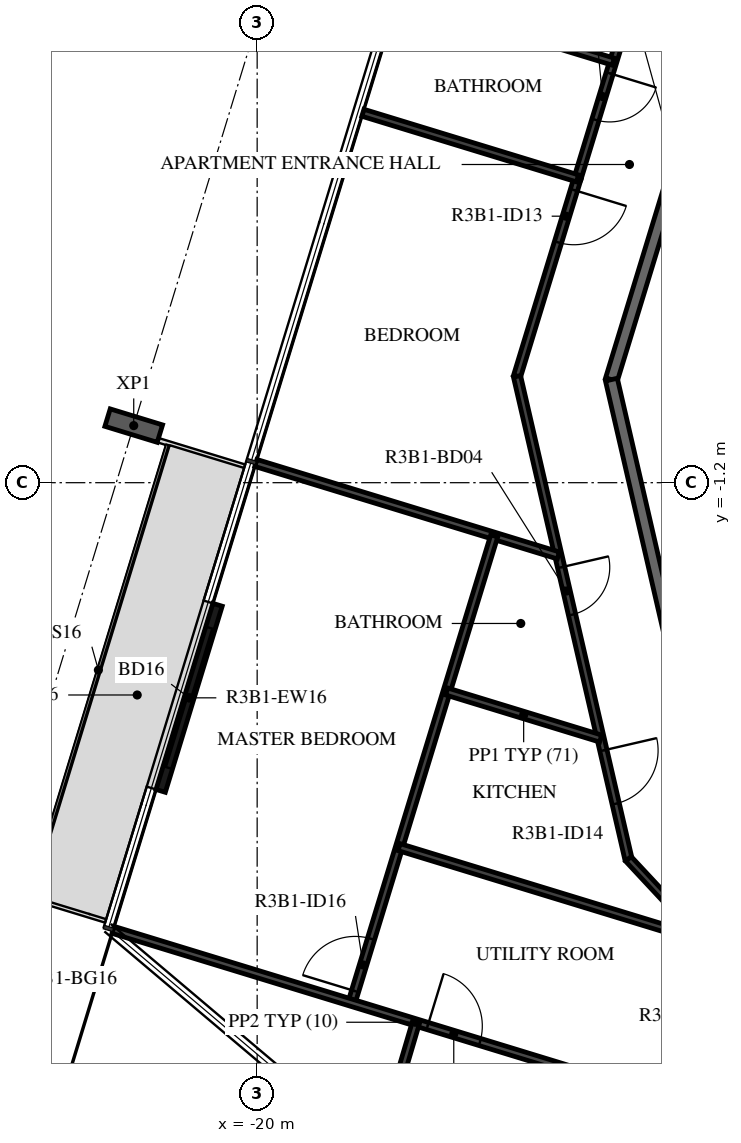
"""IFC4 building model, lengths in metres.
Left out: names, types, materials, properties, quantities, classifications, styles, units other than length and angle.
Written with IfcOpenShell. Run it as: python <this file> out.ifc"""

import sys

from ifc_helpers import new_model, si_unit, direction, frame, frame_2d, origin, origin_2d, place, context, subcontext, project, spatial, rectangle, i_section, extrude, element, fill, save


model = new_model("IFC4")
c1 = context("Model", 3, precision=1e-05, world=origin(), true_north=direction((0.0, 1.0)))
c2 = subcontext(c1, "Body", "Model", "MODEL_VIEW")
j1 = project(units=[si_unit("LENGTHUNIT", "METRE"), si_unit("PLANEANGLEUNIT", "RADIAN")], contexts=[c1])
p1 = place(None, origin())
s1 = spatial("IfcSite", under=j1, at=p1, CompositionType="ELEMENT")
p2 = place(p1, origin())
s2 = spatial("IfcBuilding", under=s1, at=p2, CompositionType="ELEMENT")
p3 = place(p2, frame((0.0, 0.0, 123.9)))
s3 = spatial("IfcBuildingStorey", under=s2, at=p3, CompositionType="ELEMENT", Elevation=123.9)
p4 = place(p3, frame((-22.03, -0.261, -0.38), z_axis=(0.0, 0.0, 1.0), x_axis=(0.29237190653, 0.956304694264, 0.0)))
e1 = element("IfcColumn", 1, at=p4, inside=s3, PredefinedType="COLUMN", context=c2, shape_type="SweptSolid", body=[
    extrude(i_section(OverallWidth=0.3, OverallDepth=0.9, WebThickness=0.019, FlangeThickness=0.035, FilletRadius=0.03, at=origin_2d()), origin(), (0.0, 0.0, 1.0), 3.5),
])
p5 = place(p3, frame((-20.651, -3.208, 0.0), z_axis=(0.0, 0.0, 1.0), x_axis=(-0.292369725807, -0.956305360976, 0.0)))
e2 = element("IfcWall", 2, at=p5, inside=s3, PredefinedType="STANDARD", context=c2, shape_type="SweptSolid", body=[
    extrude(rectangle(XDim=3.2, YDim=0.16, at=frame_2d((1.6, 0.0))), origin(), (0.0, 0.0, 1.0), 3.12),
])
p6 = place(p5, frame((0.4, 0.0, 0.0)))
e3 = element("IfcOpeningElement", 3, at=p6, cuts=e2, PredefinedType="OPENING", context=c2, shape_type="SweptSolid", body=[
    extrude(rectangle(XDim=2.4, YDim=2.4, at=frame_2d((1.2, 1.2))), frame((0.0, 0.09, 0.0), z_axis=(0.0, -1.0, 0.0), x_axis=(1.0, 0.0, 0.0)), (0.0, 0.0, 1.0), 0.18),
])
p7 = place(p3, frame((-12.028, 7.516, 0.0), z_axis=(0.0, 0.0, 1.0), x_axis=(-0.292365533182, -0.956306642771, 0.0)))
e4 = element("IfcWall", 4, at=p7, inside=s3, PredefinedType="STANDARD", context=c2, shape_type="SweptSolid", body=[
    extrude(rectangle(XDim=7.342, YDim=0.2, at=frame_2d((3.671, 0.0))), origin(), (0.0, 0.0, 1.0), 3.12),
])
p8 = place(p3, frame((-14.175, 0.495, 0.0), z_axis=(0.0, 0.0, 1.0), x_axis=(0.224922649383, -0.974376622151, 0.0)))
e5 = element("IfcWall", 5, at=p8, inside=s3, PredefinedType="STANDARD", context=c2, shape_type="SweptSolid", body=[
    extrude(rectangle(XDim=7.342, YDim=0.2, at=frame_2d((3.671, 0.0))), origin(), (0.0, 0.0, 1.0), 3.12),
])
p9 = place(p3, frame((-14.479, -13.504, 0.0), z_axis=(0.0, 0.0, 1.0), x_axis=(0.731329393611, 0.682024426278, 0.0)))
e6 = element("IfcWall", 6, at=p9, inside=s3, PredefinedType="STANDARD", context=c2, shape_type="SweptSolid", body=[
    extrude(rectangle(XDim=5.892, YDim=0.2, at=frame_2d((2.946, 0.0))), origin(), (0.0, 0.0, 1.0), 3.12),
])
p10 = place(p3, frame((-13.345, 8.339, 0.0), z_axis=(0.0, 0.0, 1.0), x_axis=(-0.292341490839, -0.956313992752, 0.0)))
e7 = element("IfcWall", 7, at=p10, inside=s3, PredefinedType="PARTITIONING", context=c2, shape_type="SweptSolid", body=[
    extrude(rectangle(XDim=4.742, YDim=0.12, at=frame_2d((2.371, 0.0))), origin(), (0.0, 0.0, 1.0), 3.12),
])
p11 = place(p10, frame((2.935, 0.0, 0.0)))
e8 = element("IfcOpeningElement", 8, at=p11, cuts=e7, PredefinedType="OPENING", context=c2, shape_type="SweptSolid", body=[
    extrude(rectangle(XDim=0.8, YDim=2.1, at=frame_2d((0.4, 1.05))), frame((0.0, 0.07, 0.0), z_axis=(0.0, -1.0, 0.0), x_axis=(1.0, 0.0, 0.0)), (0.0, 0.0, 1.0), 0.14),
])
p12 = place(p3, frame((-14.731, 3.804, 0.0), z_axis=(0.0, 0.0, 1.0), x_axis=(-0.292371609919, -0.956304784947, 0.0)))
e9 = element("IfcWall", 9, at=p12, inside=s3, PredefinedType="PARTITIONING", context=c2, shape_type="SweptSolid", body=[
    extrude(rectangle(XDim=3.404, YDim=0.12, at=frame_2d((1.702, 0.0))), origin(), (0.0, 0.0, 1.0), 3.12),
])
p13 = place(p12, frame((0.2, 0.0, 0.0)))
e10 = element("IfcOpeningElement", 10, at=p13, cuts=e9, PredefinedType="OPENING", context=c2, shape_type="SweptSolid", body=[
    extrude(rectangle(XDim=0.9, YDim=2.1, at=frame_2d((0.45, 1.05))), frame((0.0, 0.07, 0.0), z_axis=(0.0, -1.0, 0.0), x_axis=(1.0, 0.0, 0.0)), (0.0, 0.0, 1.0), 0.14),
])
p14 = place(p3, frame((-15.727, 0.549, 0.0), z_axis=(0.0, 0.0, 1.0), x_axis=(0.22493611855, -0.974373512864, 0.0)))
e11 = element("IfcWall", 11, at=p14, inside=s3, PredefinedType="PARTITIONING", context=c2, shape_type="SweptSolid", body=[
    extrude(rectangle(XDim=8.146, YDim=0.12, at=frame_2d((4.073, 0.0))), origin(), (0.0, 0.0, 1.0), 3.12),
])
p15 = place(p14, frame((3.223, 0.0, 0.0)))
e12 = element("IfcOpeningElement", 12, at=p15, cuts=e11, PredefinedType="OPENING", context=c2, shape_type="SweptSolid", body=[
    extrude(rectangle(XDim=0.8, YDim=2.1, at=frame_2d((0.4, 1.05))), frame((0.0, 0.07, 0.0), z_axis=(0.0, -1.0, 0.0), x_axis=(1.0, 0.0, 0.0)), (0.0, 0.0, 1.0), 0.14),
])
p16 = place(p14, frame((6.314, 0.0, 0.0)))
e13 = element("IfcOpeningElement", 13, at=p16, cuts=e11, PredefinedType="OPENING", context=c2, shape_type="SweptSolid", body=[
    extrude(rectangle(XDim=0.9, YDim=2.1, at=frame_2d((0.45, 1.05))), frame((0.0, 0.07, 0.0), z_axis=(0.0, -1.0, 0.0), x_axis=(1.0, 0.0, 0.0)), (0.0, 0.0, 1.0), 0.14),
])
p17 = place(p3, frame((-13.894, -7.388, 0.0), z_axis=(0.0, 0.0, 1.0), x_axis=(0.681978591143, -0.731372135935, 0.0)))
e14 = element("IfcWall", 14, at=p17, inside=s3, PredefinedType="PARTITIONING", context=c2, shape_type="SweptSolid", body=[
    extrude(rectangle(XDim=4.073, YDim=0.12, at=frame_2d((2.036, 0.0))), origin(), (0.0, 0.0, 1.0), 3.12),
])
p18 = place(p17, frame((2.033, 0.0, 0.0)))
e15 = element("IfcOpeningElement", 15, at=p18, cuts=e14, PredefinedType="OPENING", context=c2, shape_type="SweptSolid", body=[
    extrude(rectangle(XDim=0.9, YDim=2.1, at=frame_2d((0.45, 1.05))), frame((0.0, 0.07, 0.0), z_axis=(0.0, -1.0, 0.0), x_axis=(1.0, 0.0, 0.0)), (0.0, 0.0, 1.0), 0.14),
])
p19 = place(p3, frame((-17.674, 6.803, 0.0), z_axis=(0.0, 0.0, 1.0), x_axis=(0.956309456779, -0.292356328604, 0.0)))
e16 = element("IfcWall", 16, at=p19, inside=s3, PredefinedType="PARTITIONING", context=c2, shape_type="SweptSolid", body=[
    extrude(rectangle(XDim=3.691, YDim=0.12, at=frame_2d((1.846, 0.0))), origin(), (0.0, 0.0, 1.0), 2.73),
])
p20 = place(p3, frame((-14.731, 3.804, 0.0), z_axis=(0.0, 0.0, 1.0), x_axis=(-0.956303802771, 0.292374822456, 0.0)))
e17 = element("IfcWall", 17, at=p20, inside=s3, PredefinedType="PARTITIONING", context=c2, shape_type="SweptSolid", body=[
    extrude(rectangle(XDim=3.691, YDim=0.12, at=frame_2d((1.845, 0.0))), origin(), (0.0, 0.0, 1.0), 3.12),
])
p21 = place(p3, frame((-20.022, -0.875, 0.0), z_axis=(0.0, 0.0, 1.0), x_axis=(0.956311126457, -0.292350866963, 0.0)))
e18 = element("IfcWall", 18, at=p21, inside=s3, PredefinedType="PARTITIONING", context=c2, shape_type="SweptSolid", body=[
    extrude(rectangle(XDim=5.203, YDim=0.12, at=frame_2d((2.601, 0.0))), origin(), (0.0, 0.0, 1.0), 2.73),
])
p22 = place(p3, frame((-18.448, -9.752, 0.0), z_axis=(0.0, 0.0, 1.0), x_axis=(0.292365310779, 0.956306710764, 0.0)))
e19 = element("IfcWall", 19, at=p22, inside=s3, PredefinedType="PARTITIONING", context=c2, shape_type="SweptSolid", body=[
    extrude(rectangle(XDim=8.029, YDim=0.12, at=frame_2d((4.015, 0.0))), origin(), (0.0, 0.0, 1.0), 3.12),
])
p23 = place(p22, frame((0.2, 0.0, 0.0)))
e20 = element("IfcOpeningElement", 20, at=p23, cuts=e19, PredefinedType="OPENING", context=c2, shape_type="SweptSolid", body=[
    extrude(rectangle(XDim=0.9, YDim=2.1, at=frame_2d((0.45, 1.05))), frame((0.0, 0.07, 0.0), z_axis=(0.0, -1.0, 0.0), x_axis=(1.0, 0.0, 0.0)), (0.0, 0.0, 1.0), 0.14),
])
p24 = place(p3, frame((-22.369, -8.554, 0.0), z_axis=(0.0, 0.0, 1.0), x_axis=(0.956298667533, -0.292391618339, 0.0)))
e21 = element("IfcWall", 21, at=p24, inside=s3, PredefinedType="PARTITIONING", context=c2, shape_type="SweptSolid", body=[
    extrude(rectangle(XDim=10.392, YDim=0.12, at=frame_2d((5.196, 0.0))), origin(), (0.0, 0.0, 1.0), 2.73),
])
p25 = place(p24, frame((5.408, 0.0, 0.0)))
e22 = element("IfcOpeningElement", 22, at=p25, cuts=e21, PredefinedType="OPENING", context=c2, shape_type="SweptSolid", body=[
    extrude(rectangle(XDim=0.9, YDim=2.1, at=frame_2d((0.45, 1.05))), frame((0.0, 0.07, 0.0), z_axis=(0.0, -1.0, 0.0), x_axis=(1.0, 0.0, 0.0)), (0.0, 0.0, 1.0), 0.14),
])
p26 = place(p3, frame((-16.883, -4.634, 0.0), z_axis=(0.0, 0.0, 1.0), x_axis=(0.956297869455, -0.292394228526, 0.0)))
e23 = element("IfcWall", 23, at=p26, inside=s3, PredefinedType="PARTITIONING", context=c2, shape_type="SweptSolid", body=[
    extrude(rectangle(XDim=2.648, YDim=0.12, at=frame_2d((1.324, 0.0))), origin(), (0.0, 0.0, 1.0), 3.12),
])
p27 = place(p3, frame((-17.666, -7.193, 0.0), z_axis=(0.0, 0.0, 1.0), x_axis=(0.956299223218, -0.292389800905, 0.0)))
e24 = element("IfcWall", 24, at=p27, inside=s3, PredefinedType="PARTITIONING", context=c2, shape_type="SweptSolid", body=[
    extrude(rectangle(XDim=5.251, YDim=0.12, at=frame_2d((2.625, 0.0))), origin(), (0.0, 0.0, 1.0), 3.12),
])
p28 = place(p3, frame((-18.878, -15.115, 0.0), z_axis=(0.0, 0.0, 1.0), x_axis=(0.283491828289, 0.95897465206, 0.0)))
e25 = element("IfcWall", 25, at=p28, inside=s3, PredefinedType="PARTITIONING", context=c2, shape_type="SweptSolid", body=[
    extrude(rectangle(XDim=5.254, YDim=0.12, at=frame_2d((2.627, 0.0))), origin(), (0.0, 0.0, 1.0), 3.12),
])
p29 = place(p6, origin())
e26 = element("IfcDoor", 26, at=p29, inside=s3, OperationType="DOUBLE_DOOR_SLIDING", PredefinedType="DOOR", context=c2, shape_type="SweptSolid", body=[
    extrude(rectangle(XDim=2.4, YDim=2.4, at=frame_2d((1.2, 1.2))), frame((0.0, 0.025, 0.0), z_axis=(0.0, -1.0, 0.0), x_axis=(1.0, 0.0, 0.0)), (0.0, 0.0, 1.0), 0.05),
])
fill(e3, e26)
p30 = place(p13, origin())
e27 = element("IfcDoor", 27, at=p30, inside=s3, OperationType="SINGLE_SWING_RIGHT", PredefinedType="DOOR", context=c2, shape_type="SweptSolid", body=[
    extrude(rectangle(XDim=0.9, YDim=2.1, at=frame_2d((0.45, 1.05))), frame((0.0, 0.025, 0.0), z_axis=(0.0, -1.0, 0.0), x_axis=(1.0, 0.0, 0.0)), (0.0, 0.0, 1.0), 0.05),
])
fill(e10, e27)
p31 = place(p11, origin())
e28 = element("IfcDoor", 28, at=p31, inside=s3, OperationType="SINGLE_SWING_LEFT", PredefinedType="DOOR", context=c2, shape_type="SweptSolid", body=[
    extrude(rectangle(XDim=0.8, YDim=2.1, at=frame_2d((0.4, 1.05))), frame((0.0, 0.025, 0.0), z_axis=(0.0, -1.0, 0.0), x_axis=(1.0, 0.0, 0.0)), (0.0, 0.0, 1.0), 0.05),
])
fill(e8, e28)
p32 = place(p15, origin())
e29 = element("IfcDoor", 29, at=p32, inside=s3, OperationType="SINGLE_SWING_RIGHT", PredefinedType="DOOR", context=c2, shape_type="SweptSolid", body=[
    extrude(rectangle(XDim=0.8, YDim=2.1, at=frame_2d((0.4, 1.05))), frame((0.0, 0.025, 0.0), z_axis=(0.0, -1.0, 0.0), x_axis=(1.0, 0.0, 0.0)), (0.0, 0.0, 1.0), 0.05),
])
fill(e12, e29)
p33 = place(p16, origin())
e30 = element("IfcDoor", 30, at=p33, inside=s3, OperationType="SINGLE_SWING_RIGHT", PredefinedType="DOOR", context=c2, shape_type="SweptSolid", body=[
    extrude(rectangle(XDim=0.9, YDim=2.1, at=frame_2d((0.45, 1.05))), frame((0.0, 0.025, 0.0), z_axis=(0.0, -1.0, 0.0), x_axis=(1.0, 0.0, 0.0)), (0.0, 0.0, 1.0), 0.05),
])
fill(e13, e30)
p34 = place(p23, origin())
e31 = element("IfcDoor", 31, at=p34, inside=s3, OperationType="SINGLE_SWING_RIGHT", PredefinedType="DOOR", context=c2, shape_type="SweptSolid", body=[
    extrude(rectangle(XDim=0.9, YDim=2.1, at=frame_2d((0.45, 1.05))), frame((0.0, 0.025, 0.0), z_axis=(0.0, -1.0, 0.0), x_axis=(1.0, 0.0, 0.0)), (0.0, 0.0, 1.0), 0.05),
])
fill(e20, e31)
p35 = place(p25, origin())
e32 = element("IfcDoor", 32, at=p35, inside=s3, OperationType="SINGLE_SWING_RIGHT", PredefinedType="DOOR", context=c2, shape_type="SweptSolid", body=[
    extrude(rectangle(XDim=0.9, YDim=2.1, at=frame_2d((0.45, 1.05))), frame((0.0, 0.025, 0.0), z_axis=(0.0, -1.0, 0.0), x_axis=(1.0, 0.0, 0.0)), (0.0, 0.0, 1.0), 0.05),
])
fill(e22, e32)
save(model, sys.argv[1])
